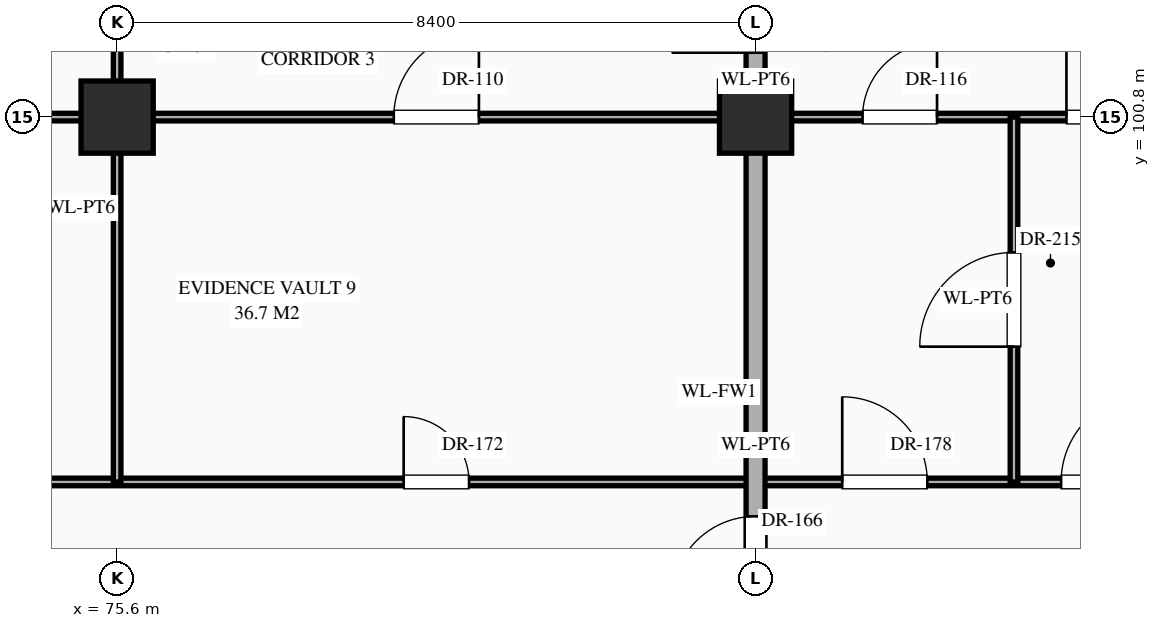
"""IFC4 building model, lengths in metres.
Left out: names, types, materials, properties, quantities, classifications, styles, units other than length and angle.
Written with IfcOpenShell. Run it as: python <this file> out.ifc"""

import sys

from ifc_helpers import new_model, si_unit, direction, frame, frame_2d, origin, origin_2d, place, context, subcontext, project, spatial, rectangle, extrude, element, fill, save


model = new_model("IFC4")
c1 = context("Model", 3, precision=1e-05, world=origin(), true_north=direction((0.0, 1.0)))
c2 = subcontext(c1, "Body", "Model", "MODEL_VIEW")
j1 = project(units=[si_unit("LENGTHUNIT", "METRE"), si_unit("PLANEANGLEUNIT", "RADIAN")], contexts=[c1])
p1 = place(None, origin())
s1 = spatial("IfcSite", under=j1, at=p1, CompositionType="ELEMENT")
p2 = place(p1, origin())
s2 = spatial("IfcBuilding", under=s1, at=p2, CompositionType="ELEMENT")
p3 = place(p2, frame((0.0, 0.0, -10.2)))
s3 = spatial("IfcBuildingStorey", under=s2, at=p3, CompositionType="ELEMENT", Elevation=-10.2)
for number, where, z_axis, x_axis in (
    (1, (75.6, 100.8, 0.0), (0.0, 0.0, 1.0), (1.0, 0.0, 0.0)),
    (2, (84.0, 100.8, 0.0), (0.0, 0.0, 1.0), (1.0, 0.0, 0.0)),
):
    element("IfcColumn", number, at=place(p3, frame(where, z_axis=z_axis, x_axis=x_axis)), inside=s3, PredefinedType="COLUMN", context=c2, shape_type="SweptSolid", body=[
        extrude(rectangle(XDim=0.95, YDim=0.95, at=origin_2d()), origin(), (0.0, 0.0, 1.0), 4.8),
    ])
p4 = place(p3, frame((0.04, 96.0, 0.0), z_axis=(0.0, 0.0, 1.0), x_axis=(1.0, 0.0, 0.0)))
e3 = element("IfcWall", 3, at=p4, inside=s3, PredefinedType="STANDARD", context=c2, shape_type="SweptSolid", body=[
    extrude(rectangle(XDim=151.16, YDim=0.1, at=frame_2d((75.58, 0.0))), origin(), (0.0, 0.0, 1.0), 4.48),
])
p5 = place(p4, frame((1.04, 0.0, 0.0)))
e4 = element("IfcOpeningElement", 4, at=p5, cuts=e3, PredefinedType="OPENING", context=c2, shape_type="SweptSolid", body=[
    extrude(rectangle(XDim=1.28, YDim=2.35, at=frame_2d((0.64, 1.175))), frame((0.0, 0.062, 0.0), z_axis=(0.0, -1.0, 0.0), x_axis=(1.0, 0.0, 0.0)), (0.0, 0.0, 1.0), 0.124),
])
p6 = place(p4, frame((4.09, 0.0, 0.0)))
e5 = element("IfcOpeningElement", 5, at=p6, cuts=e3, PredefinedType="OPENING", context=c2, shape_type="SweptSolid", body=[
    extrude(rectangle(XDim=0.94, YDim=2.3, at=frame_2d((0.47, 1.15))), frame((0.0, 0.062, 0.0), z_axis=(0.0, -1.0, 0.0), x_axis=(1.0, 0.0, 0.0)), (0.0, 0.0, 1.0), 0.124),
])
p7 = place(p4, frame((6.57, 0.0, 0.0)))
e6 = element("IfcOpeningElement", 6, at=p7, cuts=e3, PredefinedType="OPENING", context=c2, shape_type="SweptSolid", body=[
    extrude(rectangle(XDim=0.98, YDim=2.35, at=frame_2d((0.49, 1.175))), frame((0.0, 0.062, 0.0), z_axis=(0.0, -1.0, 0.0), x_axis=(1.0, 0.0, 0.0)), (0.0, 0.0, 1.0), 0.124),
])
p8 = place(p4, frame((12.05, 0.0, 0.0)))
e7 = element("IfcOpeningElement", 7, at=p8, cuts=e3, PredefinedType="OPENING", context=c2, shape_type="SweptSolid", body=[
    extrude(rectangle(XDim=1.02, YDim=2.4, at=frame_2d((0.51, 1.2))), frame((0.0, 0.062, 0.0), z_axis=(0.0, -1.0, 0.0), x_axis=(1.0, 0.0, 0.0)), (0.0, 0.0, 1.0), 0.124),
])
p9 = place(p4, frame((20.43, 0.0, 0.0)))
e8 = element("IfcOpeningElement", 8, at=p9, cuts=e3, PredefinedType="OPENING", context=c2, shape_type="SweptSolid", body=[
    extrude(rectangle(XDim=1.06, YDim=2.4, at=frame_2d((0.53, 1.2))), frame((0.0, 0.062, 0.0), z_axis=(0.0, -1.0, 0.0), x_axis=(1.0, 0.0, 0.0)), (0.0, 0.0, 1.0), 0.124),
])
p10 = place(p4, frame((26.29, 0.0, 0.0)))
e9 = element("IfcOpeningElement", 9, at=p10, cuts=e3, PredefinedType="OPENING", context=c2, shape_type="SweptSolid", body=[
    extrude(rectangle(XDim=1.14, YDim=2.4, at=frame_2d((0.57, 1.2))), frame((0.0, 0.062, 0.0), z_axis=(0.0, -1.0, 0.0), x_axis=(1.0, 0.0, 0.0)), (0.0, 0.0, 1.0), 0.124),
])
p11 = place(p4, frame((29.31, 0.0, 0.0)))
e10 = element("IfcOpeningElement", 10, at=p11, cuts=e3, PredefinedType="OPENING", context=c2, shape_type="SweptSolid", body=[
    extrude(rectangle(XDim=0.9, YDim=2.15, at=frame_2d((0.45, 1.075))), frame((0.0, 0.062, 0.0), z_axis=(0.0, -1.0, 0.0), x_axis=(1.0, 0.0, 0.0)), (0.0, 0.0, 1.0), 0.124),
])
p12 = place(p4, frame((31.83, 0.0, 0.0)))
e11 = element("IfcOpeningElement", 11, at=p12, cuts=e3, PredefinedType="OPENING", context=c2, shape_type="SweptSolid", body=[
    extrude(rectangle(XDim=0.86, YDim=2.1, at=frame_2d((0.43, 1.05))), frame((0.0, 0.062, 0.0), z_axis=(0.0, -1.0, 0.0), x_axis=(1.0, 0.0, 0.0)), (0.0, 0.0, 1.0), 0.124),
])
p13 = place(p4, frame((37.3, 0.0, 0.0)))
e12 = element("IfcOpeningElement", 12, at=p13, cuts=e3, PredefinedType="OPENING", context=c2, shape_type="SweptSolid", body=[
    extrude(rectangle(XDim=0.92, YDim=2.15, at=frame_2d((0.46, 1.075))), frame((0.0, 0.062, 0.0), z_axis=(0.0, -1.0, 0.0), x_axis=(1.0, 0.0, 0.0)), (0.0, 0.0, 1.0), 0.124),
])
p14 = place(p4, frame((45.68, 0.0, 0.0)))
e13 = element("IfcOpeningElement", 13, at=p14, cuts=e3, PredefinedType="OPENING", context=c2, shape_type="SweptSolid", body=[
    extrude(rectangle(XDim=0.96, YDim=2.2, at=frame_2d((0.48, 1.1))), frame((0.0, 0.062, 0.0), z_axis=(0.0, -1.0, 0.0), x_axis=(1.0, 0.0, 0.0)), (0.0, 0.0, 1.0), 0.124),
])
p15 = place(p4, frame((51.57, 0.0, 0.0)))
e14 = element("IfcOpeningElement", 14, at=p15, cuts=e3, PredefinedType="OPENING", context=c2, shape_type="SweptSolid", body=[
    extrude(rectangle(XDim=0.98, YDim=2.35, at=frame_2d((0.49, 1.175))), frame((0.0, 0.062, 0.0), z_axis=(0.0, -1.0, 0.0), x_axis=(1.0, 0.0, 0.0)), (0.0, 0.0, 1.0), 0.124),
])
p16 = place(p4, frame((54.45, 0.0, 0.0)))
e15 = element("IfcOpeningElement", 15, at=p16, cuts=e3, PredefinedType="OPENING", context=c2, shape_type="SweptSolid", body=[
    extrude(rectangle(XDim=1.02, YDim=2.4, at=frame_2d((0.51, 1.2))), frame((0.0, 0.062, 0.0), z_axis=(0.0, -1.0, 0.0), x_axis=(1.0, 0.0, 0.0)), (0.0, 0.0, 1.0), 0.124),
])
p17 = place(p4, frame((56.93, 0.0, 0.0)))
e16 = element("IfcOpeningElement", 16, at=p17, cuts=e3, PredefinedType="OPENING", context=c2, shape_type="SweptSolid", body=[
    extrude(rectangle(XDim=1.06, YDim=2.4, at=frame_2d((0.53, 1.2))), frame((0.0, 0.062, 0.0), z_axis=(0.0, -1.0, 0.0), x_axis=(1.0, 0.0, 0.0)), (0.0, 0.0, 1.0), 0.124),
])
p18 = place(p4, frame((62.39, 0.0, 0.0)))
e17 = element("IfcOpeningElement", 17, at=p18, cuts=e3, PredefinedType="OPENING", context=c2, shape_type="SweptSolid", body=[
    extrude(rectangle(XDim=1.14, YDim=2.4, at=frame_2d((0.57, 1.2))), frame((0.0, 0.062, 0.0), z_axis=(0.0, -1.0, 0.0), x_axis=(1.0, 0.0, 0.0)), (0.0, 0.0, 1.0), 0.124),
])
p19 = place(p4, frame((70.91, 0.0, 0.0)))
e18 = element("IfcOpeningElement", 18, at=p19, cuts=e3, PredefinedType="OPENING", context=c2, shape_type="SweptSolid", body=[
    extrude(rectangle(XDim=0.9, YDim=2.15, at=frame_2d((0.45, 1.075))), frame((0.0, 0.062, 0.0), z_axis=(0.0, -1.0, 0.0), x_axis=(1.0, 0.0, 0.0)), (0.0, 0.0, 1.0), 0.124),
])
p20 = place(p4, frame((79.33, 0.0, 0.0)))
e19 = element("IfcOpeningElement", 19, at=p20, cuts=e3, PredefinedType="OPENING", context=c2, shape_type="SweptSolid", body=[
    extrude(rectangle(XDim=0.86, YDim=2.1, at=frame_2d((0.43, 1.05))), frame((0.0, 0.062, 0.0), z_axis=(0.0, -1.0, 0.0), x_axis=(1.0, 0.0, 0.0)), (0.0, 0.0, 1.0), 0.124),
])
p21 = place(p4, frame((85.1, 0.0, 0.0)))
e20 = element("IfcOpeningElement", 20, at=p21, cuts=e3, PredefinedType="OPENING", context=c2, shape_type="SweptSolid", body=[
    extrude(rectangle(XDim=1.12, YDim=2.25, at=frame_2d((0.56, 1.125))), frame((0.0, 0.062, 0.0), z_axis=(0.0, -1.0, 0.0), x_axis=(1.0, 0.0, 0.0)), (0.0, 0.0, 1.0), 0.124),
])
p22 = place(p4, frame((87.98, 0.0, 0.0)))
e21 = element("IfcOpeningElement", 21, at=p22, cuts=e3, PredefinedType="OPENING", context=c2, shape_type="SweptSolid", body=[
    extrude(rectangle(XDim=1.16, YDim=2.3, at=frame_2d((0.58, 1.15))), frame((0.0, 0.062, 0.0), z_axis=(0.0, -1.0, 0.0), x_axis=(1.0, 0.0, 0.0)), (0.0, 0.0, 1.0), 0.124),
])
p23 = place(p4, frame((90.46, 0.0, 0.0)))
e22 = element("IfcOpeningElement", 22, at=p23, cuts=e3, PredefinedType="OPENING", context=c2, shape_type="SweptSolid", body=[
    extrude(rectangle(XDim=1.2, YDim=2.35, at=frame_2d((0.6, 1.175))), frame((0.0, 0.062, 0.0), z_axis=(0.0, -1.0, 0.0), x_axis=(1.0, 0.0, 0.0)), (0.0, 0.0, 1.0), 0.124),
])
p24 = place(p4, frame((95.94, 0.0, 0.0)))
e23 = element("IfcOpeningElement", 23, at=p24, cuts=e3, PredefinedType="OPENING", context=c2, shape_type="SweptSolid", body=[
    extrude(rectangle(XDim=1.24, YDim=2.3, at=frame_2d((0.62, 1.15))), frame((0.0, 0.062, 0.0), z_axis=(0.0, -1.0, 0.0), x_axis=(1.0, 0.0, 0.0)), (0.0, 0.0, 1.0), 0.124),
])
p25 = place(p4, frame((104.32, 0.0, 0.0)))
e24 = element("IfcOpeningElement", 24, at=p25, cuts=e3, PredefinedType="OPENING", context=c2, shape_type="SweptSolid", body=[
    extrude(rectangle(XDim=1.28, YDim=2.35, at=frame_2d((0.64, 1.175))), frame((0.0, 0.062, 0.0), z_axis=(0.0, -1.0, 0.0), x_axis=(1.0, 0.0, 0.0)), (0.0, 0.0, 1.0), 0.124),
])
p26 = place(p4, frame((110.39, 0.0, 0.0)))
e25 = element("IfcOpeningElement", 25, at=p26, cuts=e3, PredefinedType="OPENING", context=c2, shape_type="SweptSolid", body=[
    extrude(rectangle(XDim=0.94, YDim=2.3, at=frame_2d((0.47, 1.15))), frame((0.0, 0.062, 0.0), z_axis=(0.0, -1.0, 0.0), x_axis=(1.0, 0.0, 0.0)), (0.0, 0.0, 1.0), 0.124),
])
p27 = place(p4, frame((113.27, 0.0, 0.0)))
e26 = element("IfcOpeningElement", 26, at=p27, cuts=e3, PredefinedType="OPENING", context=c2, shape_type="SweptSolid", body=[
    extrude(rectangle(XDim=0.98, YDim=2.35, at=frame_2d((0.49, 1.175))), frame((0.0, 0.062, 0.0), z_axis=(0.0, -1.0, 0.0), x_axis=(1.0, 0.0, 0.0)), (0.0, 0.0, 1.0), 0.124),
])
p28 = place(p4, frame((115.75, 0.0, 0.0)))
e27 = element("IfcOpeningElement", 27, at=p28, cuts=e3, PredefinedType="OPENING", context=c2, shape_type="SweptSolid", body=[
    extrude(rectangle(XDim=1.02, YDim=2.4, at=frame_2d((0.51, 1.2))), frame((0.0, 0.062, 0.0), z_axis=(0.0, -1.0, 0.0), x_axis=(1.0, 0.0, 0.0)), (0.0, 0.0, 1.0), 0.124),
])
p29 = place(p4, frame((121.24, 0.0, 0.0)))
e28 = element("IfcOpeningElement", 28, at=p29, cuts=e3, PredefinedType="OPENING", context=c2, shape_type="SweptSolid", body=[
    extrude(rectangle(XDim=1.04, YDim=2.2, at=frame_2d((0.52, 1.1))), frame((0.0, 0.062, 0.0), z_axis=(0.0, -1.0, 0.0), x_axis=(1.0, 0.0, 0.0)), (0.0, 0.0, 1.0), 0.124),
])
p30 = place(p4, frame((129.62, 0.0, 0.0)))
e29 = element("IfcOpeningElement", 29, at=p30, cuts=e3, PredefinedType="OPENING", context=c2, shape_type="SweptSolid", body=[
    extrude(rectangle(XDim=1.08, YDim=2.25, at=frame_2d((0.54, 1.125))), frame((0.0, 0.062, 0.0), z_axis=(0.0, -1.0, 0.0), x_axis=(1.0, 0.0, 0.0)), (0.0, 0.0, 1.0), 0.124),
])
p31 = place(p4, frame((135.5, 0.0, 0.0)))
e30 = element("IfcOpeningElement", 30, at=p31, cuts=e3, PredefinedType="OPENING", context=c2, shape_type="SweptSolid", body=[
    extrude(rectangle(XDim=1.12, YDim=2.25, at=frame_2d((0.56, 1.125))), frame((0.0, 0.062, 0.0), z_axis=(0.0, -1.0, 0.0), x_axis=(1.0, 0.0, 0.0)), (0.0, 0.0, 1.0), 0.124),
])
p32 = place(p4, frame((138.38, 0.0, 0.0)))
e31 = element("IfcOpeningElement", 31, at=p32, cuts=e3, PredefinedType="OPENING", context=c2, shape_type="SweptSolid", body=[
    extrude(rectangle(XDim=1.16, YDim=2.3, at=frame_2d((0.58, 1.15))), frame((0.0, 0.062, 0.0), z_axis=(0.0, -1.0, 0.0), x_axis=(1.0, 0.0, 0.0)), (0.0, 0.0, 1.0), 0.124),
])
p33 = place(p4, frame((140.86, 0.0, 0.0)))
e32 = element("IfcOpeningElement", 32, at=p33, cuts=e3, PredefinedType="OPENING", context=c2, shape_type="SweptSolid", body=[
    extrude(rectangle(XDim=1.2, YDim=2.35, at=frame_2d((0.6, 1.175))), frame((0.0, 0.062, 0.0), z_axis=(0.0, -1.0, 0.0), x_axis=(1.0, 0.0, 0.0)), (0.0, 0.0, 1.0), 0.124),
])
p34 = place(p4, frame((146.34, 0.0, 0.0)))
e33 = element("IfcOpeningElement", 33, at=p34, cuts=e3, PredefinedType="OPENING", context=c2, shape_type="SweptSolid", body=[
    extrude(rectangle(XDim=1.24, YDim=2.3, at=frame_2d((0.62, 1.15))), frame((0.0, 0.062, 0.0), z_axis=(0.0, -1.0, 0.0), x_axis=(1.0, 0.0, 0.0)), (0.0, 0.0, 1.0), 0.124),
])
p35 = place(p3, frame((71.4, 100.8, 0.0), z_axis=(0.0, 0.0, 1.0), x_axis=(1.0, 0.0, 0.0)))
e34 = element("IfcWall", 34, at=p35, inside=s3, PredefinedType="STANDARD", context=c2, shape_type="SweptSolid", body=[
    extrude(rectangle(XDim=25.2, YDim=0.1, at=frame_2d((12.6, 0.0))), origin(), (0.0, 0.0, 1.0), 3.63),
])
p36 = place(p35, frame((1.413, 0.0, 0.0)))
e35 = element("IfcOpeningElement", 35, at=p36, cuts=e34, PredefinedType="OPENING", context=c2, shape_type="SweptSolid", body=[
    extrude(rectangle(XDim=0.98, YDim=2.35, at=frame_2d((0.49, 1.175))), frame((0.0, 0.062, 0.0), z_axis=(0.0, -1.0, 0.0), x_axis=(1.0, 0.0, 0.0)), (0.0, 0.0, 1.0), 0.124),
])
p37 = place(p35, frame((22.867, 0.0, 0.0)))
e36 = element("IfcOpeningElement", 36, at=p37, cuts=e34, PredefinedType="OPENING", context=c2, shape_type="SweptSolid", body=[
    extrude(rectangle(XDim=0.86, YDim=2.1, at=frame_2d((0.43, 1.05))), frame((0.0, 0.062, 0.0), z_axis=(0.0, -1.0, 0.0), x_axis=(1.0, 0.0, 0.0)), (0.0, 0.0, 1.0), 0.124),
])
p38 = place(p35, frame((7.84, 0.0, 0.0)))
e37 = element("IfcOpeningElement", 37, at=p38, cuts=e34, PredefinedType="OPENING", context=c2, shape_type="SweptSolid", body=[
    extrude(rectangle(XDim=1.12, YDim=2.25, at=frame_2d((0.56, 1.125))), frame((0.0, 0.062, 0.0), z_axis=(0.0, -1.0, 0.0), x_axis=(1.0, 0.0, 0.0)), (0.0, 0.0, 1.0), 0.124),
])
p39 = place(p35, frame((14.008, 0.0, 0.0)))
e38 = element("IfcOpeningElement", 38, at=p39, cuts=e34, PredefinedType="OPENING", context=c2, shape_type="SweptSolid", body=[
    extrude(rectangle(XDim=0.98, YDim=2.35, at=frame_2d((0.49, 1.175))), frame((0.0, 0.062, 0.0), z_axis=(0.0, -1.0, 0.0), x_axis=(1.0, 0.0, 0.0)), (0.0, 0.0, 1.0), 0.124),
])
p40 = place(p35, frame((16.69, 0.0, 0.0)))
e39 = element("IfcOpeningElement", 39, at=p40, cuts=e34, PredefinedType="OPENING", context=c2, shape_type="SweptSolid", body=[
    extrude(rectangle(XDim=1.02, YDim=2.4, at=frame_2d((0.51, 1.2))), frame((0.0, 0.062, 0.0), z_axis=(0.0, -1.0, 0.0), x_axis=(1.0, 0.0, 0.0)), (0.0, 0.0, 1.0), 0.124),
])
p41 = place(p35, frame((18.972, 0.0, 0.0)))
e40 = element("IfcOpeningElement", 40, at=p41, cuts=e34, PredefinedType="OPENING", context=c2, shape_type="SweptSolid", body=[
    extrude(rectangle(XDim=1.06, YDim=2.4, at=frame_2d((0.53, 1.2))), frame((0.0, 0.062, 0.0), z_axis=(0.0, -1.0, 0.0), x_axis=(1.0, 0.0, 0.0)), (0.0, 0.0, 1.0), 0.124),
])
p42 = place(p3, frame((75.6, 96.0, 0.0), z_axis=(0.0, 0.0, 1.0), x_axis=(0.0, 1.0, 0.0)))
e41 = element("IfcWall", 41, at=p42, inside=s3, PredefinedType="STANDARD", context=c2, shape_type="SweptSolid", body=[
    extrude(rectangle(XDim=7.2, YDim=0.1, at=frame_2d((3.6, 0.0))), origin(), (0.0, 0.0, 1.0), 3.73),
])
p43 = place(p42, frame((5.728, 0.0, 0.0)))
e42 = element("IfcOpeningElement", 42, at=p43, cuts=e41, PredefinedType="OPENING", context=c2, shape_type="SweptSolid", body=[
    extrude(rectangle(XDim=0.94, YDim=2.3, at=frame_2d((0.47, 1.15))), frame((0.0, 0.062, 0.0), z_axis=(0.0, -1.0, 0.0), x_axis=(1.0, 0.0, 0.0)), (0.0, 0.0, 1.0), 0.124),
])
p44 = place(p3, frame((84.0, 79.2, 0.0), z_axis=(0.0, 0.0, 1.0), x_axis=(0.0, 1.0, 0.0)))
e43 = element("IfcWall", 43, at=p44, inside=s3, PredefinedType="STANDARD", context=c2, shape_type="SweptSolid", body=[
    extrude(rectangle(XDim=35.96, YDim=0.25, at=frame_2d((17.98, 0.0))), origin(), (0.0, 0.0, 1.0), 3.73),
])
p45 = place(p44, frame((22.448, 0.0, 0.0)))
e44 = element("IfcOpeningElement", 44, at=p45, cuts=e43, PredefinedType="OPENING", context=c2, shape_type="SweptSolid", body=[
    extrude(rectangle(XDim=1.1, YDim=2.2, at=frame_2d((0.55, 1.1))), frame((0.0, 0.137, 0.0), z_axis=(0.0, -1.0, 0.0), x_axis=(1.0, 0.0, 0.0)), (0.0, 0.0, 1.0), 0.274),
])
p46 = place(p44, frame((12.502, 0.0, 0.0)))
e45 = element("IfcOpeningElement", 45, at=p46, cuts=e43, PredefinedType="OPENING", context=c2, shape_type="SweptSolid", body=[
    extrude(rectangle(XDim=1.0, YDim=2.2, at=frame_2d((0.5, 1.1))), frame((0.0, 0.137, 0.0), z_axis=(0.0, -1.0, 0.0), x_axis=(1.0, 0.0, 0.0)), (0.0, 0.0, 1.0), 0.274),
])
p47 = place(p44, frame((15.248, 0.0, 0.0)))
e46 = element("IfcOpeningElement", 46, at=p47, cuts=e43, PredefinedType="OPENING", context=c2, shape_type="SweptSolid", body=[
    extrude(rectangle(XDim=1.1, YDim=2.2, at=frame_2d((0.55, 1.1))), frame((0.0, 0.137, 0.0), z_axis=(0.0, -1.0, 0.0), x_axis=(1.0, 0.0, 0.0)), (0.0, 0.0, 1.0), 0.274),
])
p48 = place(p44, frame((29.722, 0.0, 0.0)))
e47 = element("IfcOpeningElement", 47, at=p48, cuts=e43, PredefinedType="OPENING", context=c2, shape_type="SweptSolid", body=[
    extrude(rectangle(XDim=0.95, YDim=2.15, at=frame_2d((0.475, 1.075))), frame((0.0, 0.137, 0.0), z_axis=(0.0, -1.0, 0.0), x_axis=(1.0, 0.0, 0.0)), (0.0, 0.0, 1.0), 0.274),
])
p49 = place(p44, frame((5.302, 0.0, 0.0)))
e48 = element("IfcOpeningElement", 48, at=p49, cuts=e43, PredefinedType="OPENING", context=c2, shape_type="SweptSolid", body=[
    extrude(rectangle(XDim=1.0, YDim=2.2, at=frame_2d((0.5, 1.1))), frame((0.0, 0.137, 0.0), z_axis=(0.0, -1.0, 0.0), x_axis=(1.0, 0.0, 0.0)), (0.0, 0.0, 1.0), 0.274),
])
p50 = place(p3, frame((87.4, 96.0, 0.0), z_axis=(0.0, 0.0, 1.0), x_axis=(0.0, 1.0, 0.0)))
e49 = element("IfcWall", 49, at=p50, inside=s3, PredefinedType="STANDARD", context=c2, shape_type="SweptSolid", body=[
    extrude(rectangle(XDim=4.8, YDim=0.1, at=frame_2d((2.4, 0.0))), origin(), (0.0, 0.0, 1.0), 4.48),
])
p51 = place(p50, frame((1.78, 0.0, 0.0)))
e50 = element("IfcOpeningElement", 50, at=p51, cuts=e49, PredefinedType="OPENING", context=c2, shape_type="SweptSolid", body=[
    extrude(rectangle(XDim=1.24, YDim=2.3, at=frame_2d((0.62, 1.15))), frame((0.0, 0.062, 0.0), z_axis=(0.0, -1.0, 0.0), x_axis=(1.0, 0.0, 0.0)), (0.0, 0.0, 1.0), 0.124),
])
p52 = place(p45, origin())
e51 = element("IfcDoor", 51, at=p52, inside=s3, OperationType="SINGLE_SWING_LEFT", PredefinedType="DOOR", context=c2, shape_type="SweptSolid", body=[
    extrude(rectangle(XDim=1.1, YDim=2.2, at=frame_2d((0.55, 1.1))), frame((0.0, 0.025, 0.0), z_axis=(0.0, -1.0, 0.0), x_axis=(1.0, 0.0, 0.0)), (0.0, 0.0, 1.0), 0.05),
])
fill(e44, e51)
p53 = place(p38, origin())
e52 = element("IfcDoor", 52, at=p53, inside=s3, OperationType="SINGLE_SWING_RIGHT", PredefinedType="DOOR", context=c2, shape_type="SweptSolid", body=[
    extrude(rectangle(XDim=1.12, YDim=2.25, at=frame_2d((0.56, 1.125))), frame((0.0, 0.025, 0.0), z_axis=(0.0, -1.0, 0.0), x_axis=(1.0, 0.0, 0.0)), (0.0, 0.0, 1.0), 0.05),
])
fill(e37, e52)
p54 = place(p39, origin())
e53 = element("IfcDoor", 53, at=p54, inside=s3, OperationType="SINGLE_SWING_RIGHT", PredefinedType="DOOR", context=c2, shape_type="SweptSolid", body=[
    extrude(rectangle(XDim=0.98, YDim=2.35, at=frame_2d((0.49, 1.175))), frame((0.0, 0.025, 0.0), z_axis=(0.0, -1.0, 0.0), x_axis=(1.0, 0.0, 0.0)), (0.0, 0.0, 1.0), 0.05),
])
fill(e38, e53)
p55 = place(p40, origin())
e54 = element("IfcDoor", 54, at=p55, inside=s3, OperationType="SINGLE_SWING_LEFT", PredefinedType="DOOR", context=c2, shape_type="SweptSolid", body=[
    extrude(rectangle(XDim=1.02, YDim=2.4, at=frame_2d((0.51, 1.2))), frame((0.0, 0.025, 0.0), z_axis=(0.0, -1.0, 0.0), x_axis=(1.0, 0.0, 0.0)), (0.0, 0.0, 1.0), 0.05),
])
fill(e39, e54)
p56 = place(p47, origin())
e55 = element("IfcDoor", 55, at=p56, inside=s3, OperationType="SINGLE_SWING_LEFT", PredefinedType="DOOR", context=c2, shape_type="SweptSolid", body=[
    extrude(rectangle(XDim=1.1, YDim=2.2, at=frame_2d((0.55, 1.1))), frame((0.0, 0.025, 0.0), z_axis=(0.0, -1.0, 0.0), x_axis=(1.0, 0.0, 0.0)), (0.0, 0.0, 1.0), 0.05),
])
fill(e46, e55)
p57 = place(p20, origin())
e56 = element("IfcDoor", 56, at=p57, inside=s3, OperationType="SINGLE_SWING_LEFT", PredefinedType="DOOR", context=c2, shape_type="SweptSolid", body=[
    extrude(rectangle(XDim=0.86, YDim=2.1, at=frame_2d((0.43, 1.05))), frame((0.0, 0.025, 0.0), z_axis=(0.0, -1.0, 0.0), x_axis=(1.0, 0.0, 0.0)), (0.0, 0.0, 1.0), 0.05),
])
fill(e19, e56)
p58 = place(p21, origin())
e57 = element("IfcDoor", 57, at=p58, inside=s3, OperationType="SINGLE_SWING_LEFT", PredefinedType="DOOR", context=c2, shape_type="SweptSolid", body=[
    extrude(rectangle(XDim=1.12, YDim=2.25, at=frame_2d((0.56, 1.125))), frame((0.0, 0.025, 0.0), z_axis=(0.0, -1.0, 0.0), x_axis=(1.0, 0.0, 0.0)), (0.0, 0.0, 1.0), 0.05),
])
fill(e20, e57)
p59 = place(p22, origin())
e58 = element("IfcDoor", 58, at=p59, inside=s3, OperationType="SINGLE_SWING_RIGHT", PredefinedType="DOOR", context=c2, shape_type="SweptSolid", body=[
    extrude(rectangle(XDim=1.16, YDim=2.3, at=frame_2d((0.58, 1.15))), frame((0.0, 0.025, 0.0), z_axis=(0.0, -1.0, 0.0), x_axis=(1.0, 0.0, 0.0)), (0.0, 0.0, 1.0), 0.05),
])
fill(e21, e58)
p60 = place(p51, origin())
e59 = element("IfcDoor", 59, at=p60, inside=s3, OperationType="SINGLE_SWING_LEFT", PredefinedType="DOOR", context=c2, shape_type="SweptSolid", body=[
    extrude(rectangle(XDim=1.24, YDim=2.3, at=frame_2d((0.62, 1.15))), frame((0.0, 0.025, 0.0), z_axis=(0.0, -1.0, 0.0), x_axis=(1.0, 0.0, 0.0)), (0.0, 0.0, 1.0), 0.05),
])
fill(e50, e59)
save(model, sys.argv[1])
